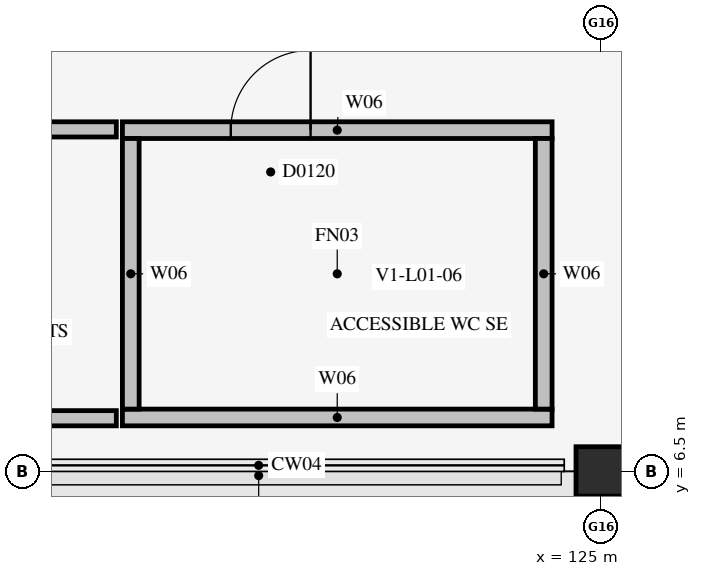
"""IFC4 building model, lengths in metres.
Left out: names, types, materials, properties, quantities, classifications, styles, units other than length and angle.
Written with IfcOpenShell. Run it as: python <this file> out.ifc"""

import sys

from ifc_helpers import new_model, si_unit, direction, frame, frame_2d, origin, origin_2d, place, context, subcontext, project, spatial, rectangle, extrude, element, fill, save


model = new_model("IFC4")
c1 = context("Model", 3, precision=1e-05, world=origin(), true_north=direction((0.0, 1.0)))
c2 = subcontext(c1, "Body", "Model", "MODEL_VIEW")
j1 = project(units=[si_unit("LENGTHUNIT", "METRE"), si_unit("PLANEANGLEUNIT", "RADIAN")], contexts=[c1])
p1 = place(None, origin())
s1 = spatial("IfcSite", under=j1, at=p1, CompositionType="ELEMENT")
p2 = place(p1, origin())
s2 = spatial("IfcBuilding", under=s1, at=p2, CompositionType="ELEMENT")
p3 = place(p2, frame((0.0, 0.0, 5.4)))
s3 = spatial("IfcBuildingStorey", under=s2, at=p3, CompositionType="ELEMENT", Elevation=5.4)
p4 = place(p3, frame((125.0, 6.5, 0.0), z_axis=(0.0, 0.0, 1.0), x_axis=(1.0, 0.0, 0.0)))
e1 = element("IfcColumn", 1, at=p4, inside=s3, PredefinedType="COLUMN", context=c2, shape_type="SweptSolid", body=[
    extrude(rectangle(XDim=0.65, YDim=0.65, at=origin_2d()), origin(), (0.0, 0.0, 1.0), 4.48),
])
p5 = place(p3, frame((112.973, 7.2, 0.0), z_axis=(0.0, 0.0, 1.0), x_axis=(1.0, 0.0, 0.0)))
e2 = element("IfcWall", 2, at=p5, inside=s3, PredefinedType="PLUMBINGWALL", context=c2, shape_type="SweptSolid", body=[
    extrude(rectangle(XDim=5.654, YDim=0.2, at=frame_2d((2.827, 0.0))), origin(), (0.0, 0.0, 1.0), 4.465),
])
p6 = place(p3, frame((112.973, 11.0, 0.0), z_axis=(0.0, 0.0, 1.0), x_axis=(1.0, 0.0, 0.0)))
e3 = element("IfcWall", 3, at=p6, inside=s3, PredefinedType="PLUMBINGWALL", context=c2, shape_type="SweptSolid", body=[
    extrude(rectangle(XDim=5.654, YDim=0.2, at=frame_2d((2.827, 0.0))), origin(), (0.0, 0.0, 1.0), 4.465),
])
p7 = place(p6, frame((1.463, 0.0, 0.0)))
e4 = element("IfcOpeningElement", 4, at=p7, cuts=e3, PredefinedType="OPENING", context=c2, shape_type="SweptSolid", body=[
    extrude(rectangle(XDim=0.9, YDim=2.1, at=frame_2d((0.45, 1.05))), frame((0.0, 0.112, 0.0), z_axis=(0.0, -1.0, 0.0), x_axis=(1.0, 0.0, 0.0)), (0.0, 0.0, 1.0), 0.224),
])
p8 = place(p3, frame((118.707, 7.21, 0.0), z_axis=(0.0, 0.0, 1.0), x_axis=(1.0, 0.0, 0.0)))
e5 = element("IfcWall", 5, at=p8, inside=s3, PredefinedType="PLUMBINGWALL", context=c2, shape_type="SweptSolid", body=[
    extrude(rectangle(XDim=5.653, YDim=0.22, at=frame_2d((2.827, 0.0))), origin(), (0.0, 0.0, 1.0), 4.465),
])
p9 = place(p3, frame((118.707, 10.99, 0.0), z_axis=(0.0, 0.0, 1.0), x_axis=(1.0, 0.0, 0.0)))
e6 = element("IfcWall", 6, at=p9, inside=s3, PredefinedType="PLUMBINGWALL", context=c2, shape_type="SweptSolid", body=[
    extrude(rectangle(XDim=5.653, YDim=0.22, at=frame_2d((2.827, 0.0))), origin(), (0.0, 0.0, 1.0), 4.465),
])
p10 = place(p9, frame((1.426, 0.0, 0.0)))
e7 = element("IfcOpeningElement", 7, at=p10, cuts=e6, PredefinedType="OPENING", context=c2, shape_type="SweptSolid", body=[
    extrude(rectangle(XDim=1.05, YDim=2.15, at=frame_2d((0.525, 1.075))), frame((0.0, 0.122, 0.0), z_axis=(0.0, -1.0, 0.0), x_axis=(1.0, 0.0, 0.0)), (0.0, 0.0, 1.0), 0.244),
])
for number, where, z_axis, x_axis in (
    (8, (124.25, 7.32, 0.0), (0.0, 0.0, 1.0), (0.0, 1.0, 0.0)),
    (9, (118.817, 7.32, 0.0), (0.0, 0.0, 1.0), (0.0, 1.0, 0.0)),
):
    element("IfcWall", number, at=place(p3, frame(where, z_axis=z_axis, x_axis=x_axis)), inside=s3, PredefinedType="PLUMBINGWALL", context=c2, shape_type="SweptSolid", body=[
        extrude(rectangle(XDim=3.56, YDim=0.22, at=frame_2d((1.78, 0.0))), origin(), (0.0, 0.0, 1.0), 4.465),
    ])
p11 = place(p10, frame((1.05, 0.0, 0.0), z_axis=(0.0, 0.0, 1.0), x_axis=(-1.0, 0.0, 0.0)))
e10 = element("IfcDoor", 10, at=p11, inside=s3, OperationType="SINGLE_SWING_RIGHT", PredefinedType="DOOR", context=c2, shape_type="SweptSolid", body=[
    extrude(rectangle(XDim=1.05, YDim=2.15, at=frame_2d((0.525, 1.075))), frame((0.0, 0.025, 0.0), z_axis=(0.0, -1.0, 0.0), x_axis=(1.0, 0.0, 0.0)), (0.0, 0.0, 1.0), 0.05),
])
fill(e7, e10)
save(model, sys.argv[1])
